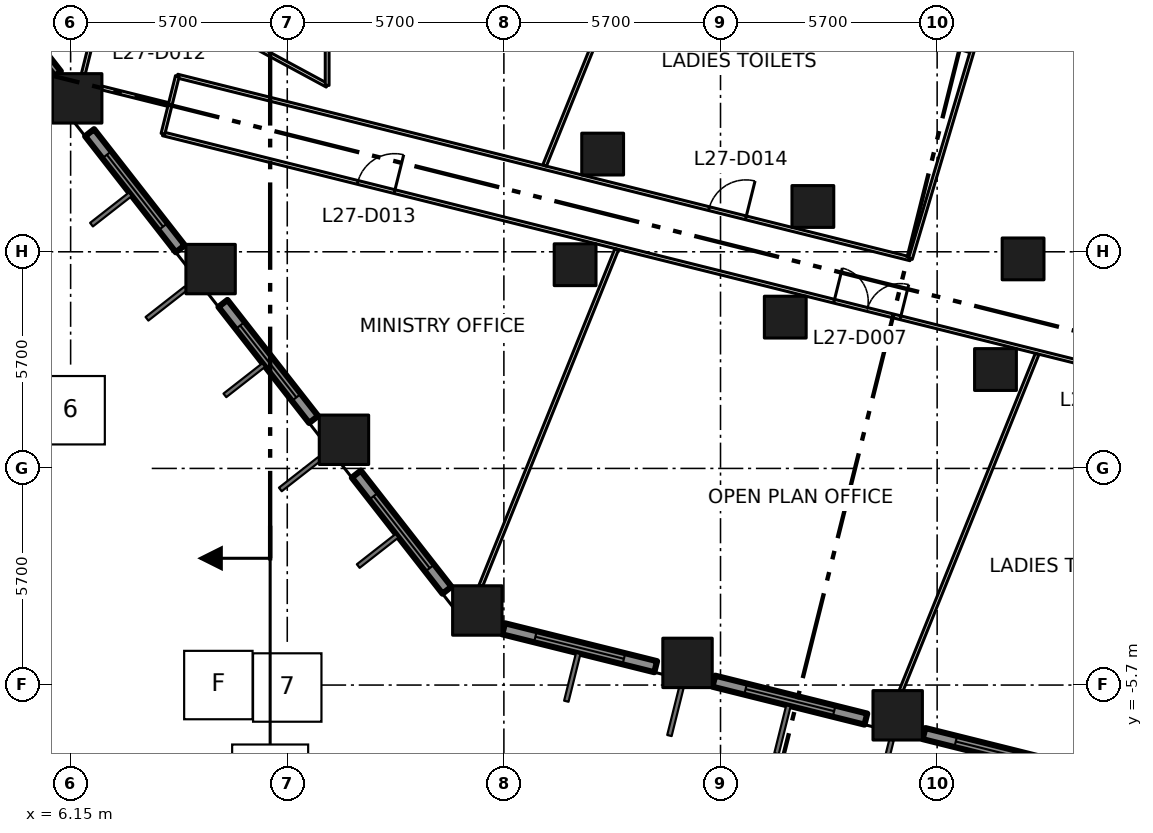
"""IFC4 building model, lengths in metres.
Left out: names, types, materials, properties, quantities, classifications, styles, units other than length and angle.
Written with IfcOpenShell. Run it as: python <this file> out.ifc"""

import sys

from ifc_helpers import new_model, si_unit, direction, frame, frame_2d, origin, origin_2d, place, context, subcontext, project, spatial, rectangle, extrude, element, fill, save


model = new_model("IFC4")
c1 = context("Model", 3, precision=1e-05, world=origin(), true_north=direction((0.0, 1.0)))
c2 = subcontext(c1, "Body", "Model", "MODEL_VIEW")
j1 = project(units=[si_unit("LENGTHUNIT", "METRE"), si_unit("PLANEANGLEUNIT", "RADIAN")], contexts=[c1])
p1 = place(None, origin())
s1 = spatial("IfcSite", under=j1, at=p1, CompositionType="ELEMENT")
p2 = place(p1, origin())
s2 = spatial("IfcBuilding", under=s1, at=p2, CompositionType="ELEMENT")
p3 = place(p2, frame((0.0, 0.0, 122.4)))
s3 = spatial("IfcBuildingStorey", under=s2, at=p3, CompositionType="ELEMENT", Elevation=122.4)
for number, where, z_axis, x_axis in (
    (1, (16.851, -3.738, 0.0), (0.0, 0.0, 1.0), (1.0, 0.0, 0.0)),
    (2, (13.342, 0.754, 0.0), (0.0, 0.0, 1.0), (1.0, 0.0, 0.0)),
    (3, (9.833, 5.245, 0.0), (0.0, 0.0, 1.0), (1.0, 0.0, 0.0)),
    (4, (6.323, 9.737, 0.0), (0.0, 0.0, 1.0), (1.0, 0.0, 0.0)),
    (5, (22.382, -5.117, 0.0), (0.0, 0.0, 1.0), (1.0, 0.0, 0.0)),
    (6, (27.912, -6.496, 0.0), (0.0, 0.0, 1.0), (1.0, 0.0, 0.0)),
):
    element("IfcColumn", number, at=place(p3, frame(where, z_axis=z_axis, x_axis=x_axis)), inside=s3, PredefinedType="COLUMN", context=c2, shape_type="SweptSolid", body=[
        extrude(rectangle(XDim=1.3, YDim=1.3, at=origin_2d()), origin(), (0.0, 0.0, 1.0), 4.2),
    ])
for number, where, z_axis, x_axis in (
    (7, (19.424, 5.36, 0.0), (0.0, 0.0, 1.0), (1.0, 0.0, 0.0)),
    (8, (24.954, 3.981, 0.0), (0.0, 0.0, 1.0), (1.0, 0.0, 0.0)),
    (9, (30.485, 2.602, 0.0), (0.0, 0.0, 1.0), (1.0, 0.0, 0.0)),
    (10, (20.149, 8.271, 0.0), (0.0, 0.0, 1.0), (1.0, 0.0, 0.0)),
    (11, (25.68, 6.892, 0.0), (0.0, 0.0, 1.0), (1.0, 0.0, 0.0)),
    (12, (31.211, 5.513, 0.0), (0.0, 0.0, 1.0), (1.0, 0.0, 0.0)),
):
    element("IfcColumn", number, at=place(p3, frame(where, z_axis=z_axis, x_axis=x_axis)), inside=s3, PredefinedType="COLUMN", context=c2, shape_type="SweptSolid", body=[
        extrude(rectangle(XDim=1.1, YDim=1.1, at=origin_2d()), origin(), (0.0, 0.0, 1.0), 4.2),
    ])
p4 = place(p3, frame((3.322, 13.579, 0.0), z_axis=(0.0, 0.0, 1.0), x_axis=(0.615500153734, -0.78813676526, 0.0)))
e13 = element("IfcWall", 13, at=p4, inside=s3, PredefinedType="SOLIDWALL", context=c2, shape_type="SweptSolid", body=[
    extrude(rectangle(XDim=4.05, YDim=0.2, at=frame_2d((2.025, 0.0))), origin(), (0.0, 0.0, 1.0), 3.1),
])
p5 = place(p4, frame((1.125, 0.0, 0.0)))
e14 = element("IfcOpeningElement", 14, at=p5, cuts=e13, PredefinedType="OPENING", context=c2, shape_type="SweptSolid", body=[
    extrude(rectangle(XDim=1.8, YDim=2.9, at=frame_2d((0.9, 1.45))), frame((0.0, 0.11, 0.0), z_axis=(0.0, -1.0, 0.0), x_axis=(1.0, 0.0, 0.0)), (0.0, 0.0, 1.0), 0.22),
])
p6 = place(p3, frame((6.649, 8.834, 0.0), z_axis=(0.0, 0.0, 1.0), x_axis=(0.615535257281, -0.788109349674, 0.0)))
e15 = element("IfcWall", 15, at=p6, inside=s3, PredefinedType="SOLIDWALL", context=c2, shape_type="SweptSolid", body=[
    extrude(rectangle(XDim=3.876, YDim=0.3, at=frame_2d((1.938, 0.0))), origin(), (0.0, 0.0, 1.0), 3.1),
])
p7 = place(p6, frame((0.738, 0.0, 0.8)))
e16 = element("IfcOpeningElement", 16, at=p7, cuts=e15, PredefinedType="OPENING", context=c2, shape_type="SweptSolid", body=[
    extrude(rectangle(XDim=2.4, YDim=2.1, at=frame_2d((1.2, 1.05))), frame((0.0, 0.16, 0.0), z_axis=(0.0, -1.0, 0.0), x_axis=(1.0, 0.0, 0.0)), (0.0, 0.0, 1.0), 0.32),
])
p8 = place(p3, frame((10.158, 4.341, 0.0), z_axis=(0.0, 0.0, 1.0), x_axis=(0.615779754703, -0.787918329332, 0.0)))
e17 = element("IfcWall", 17, at=p8, inside=s3, PredefinedType="SOLIDWALL", context=c2, shape_type="SweptSolid", body=[
    extrude(rectangle(XDim=3.875, YDim=0.3, at=frame_2d((1.938, 0.0))), origin(), (0.0, 0.0, 1.0), 3.1),
])
p9 = place(p8, frame((0.737, 0.0, 0.8)))
e18 = element("IfcOpeningElement", 18, at=p9, cuts=e17, PredefinedType="OPENING", context=c2, shape_type="SweptSolid", body=[
    extrude(rectangle(XDim=2.4, YDim=2.1, at=frame_2d((1.2, 1.05))), frame((0.0, 0.16, 0.0), z_axis=(0.0, -1.0, 0.0), x_axis=(1.0, 0.0, 0.0)), (0.0, 0.0, 1.0), 0.32),
])
p10 = place(p3, frame((13.667, -0.15, 0.0), z_axis=(0.0, 0.0, 1.0), x_axis=(0.615626928003, -0.788037743714, 0.0)))
e19 = element("IfcWall", 19, at=p10, inside=s3, PredefinedType="SOLIDWALL", context=c2, shape_type="SweptSolid", body=[
    extrude(rectangle(XDim=3.876, YDim=0.3, at=frame_2d((1.938, 0.0))), origin(), (0.0, 0.0, 1.0), 3.1),
])
p11 = place(p10, frame((0.738, 0.0, 0.8)))
e20 = element("IfcOpeningElement", 20, at=p11, cuts=e19, PredefinedType="OPENING", context=c2, shape_type="SweptSolid", body=[
    extrude(rectangle(XDim=2.4, YDim=2.1, at=frame_2d((1.2, 1.05))), frame((0.0, 0.16, 0.0), z_axis=(0.0, -1.0, 0.0), x_axis=(1.0, 0.0, 0.0)), (0.0, 0.0, 1.0), 0.32),
])
p12 = place(p3, frame((17.543, -4.22, 0.0), z_axis=(0.0, 0.0, 1.0), x_axis=(0.970337184445, -0.241755555227, 0.0)))
e21 = element("IfcWall", 21, at=p12, inside=s3, PredefinedType="SOLIDWALL", context=c2, shape_type="SweptSolid", body=[
    extrude(rectangle(XDim=4.124, YDim=0.3, at=frame_2d((2.062, 0.0))), origin(), (0.0, 0.0, 1.0), 3.1),
])
p13 = place(p12, frame((0.862, 0.0, 0.8)))
e22 = element("IfcOpeningElement", 22, at=p13, cuts=e21, PredefinedType="OPENING", context=c2, shape_type="SweptSolid", body=[
    extrude(rectangle(XDim=2.4, YDim=2.1, at=frame_2d((1.2, 1.05))), frame((0.0, 0.16, 0.0), z_axis=(0.0, -1.0, 0.0), x_axis=(1.0, 0.0, 0.0)), (0.0, 0.0, 1.0), 0.32),
])
p14 = place(p3, frame((23.074, -5.598, 0.0), z_axis=(0.0, 0.0, 1.0), x_axis=(0.970267747908, -0.242034083076, 0.0)))
e23 = element("IfcWall", 23, at=p14, inside=s3, PredefinedType="SOLIDWALL", context=c2, shape_type="SweptSolid", body=[
    extrude(rectangle(XDim=4.124, YDim=0.3, at=frame_2d((2.062, 0.0))), origin(), (0.0, 0.0, 1.0), 3.1),
])
p15 = place(p14, frame((0.862, 0.0, 0.8)))
e24 = element("IfcOpeningElement", 24, at=p15, cuts=e23, PredefinedType="OPENING", context=c2, shape_type="SweptSolid", body=[
    extrude(rectangle(XDim=2.4, YDim=2.1, at=frame_2d((1.2, 1.05))), frame((0.0, 0.16, 0.0), z_axis=(0.0, -1.0, 0.0), x_axis=(1.0, 0.0, 0.0)), (0.0, 0.0, 1.0), 0.32),
])
p16 = place(p3, frame((28.604, -6.977, 0.0), z_axis=(0.0, 0.0, 1.0), x_axis=(0.970281616392, -0.241978480223, 0.0)))
e25 = element("IfcWall", 25, at=p16, inside=s3, PredefinedType="SOLIDWALL", context=c2, shape_type="SweptSolid", body=[
    extrude(rectangle(XDim=4.125, YDim=0.3, at=frame_2d((2.062, 0.0))), origin(), (0.0, 0.0, 1.0), 3.1),
])
p17 = place(p16, frame((0.862, 0.0, 0.8)))
e26 = element("IfcOpeningElement", 26, at=p17, cuts=e25, PredefinedType="OPENING", context=c2, shape_type="SweptSolid", body=[
    extrude(rectangle(XDim=2.4, YDim=2.1, at=frame_2d((1.2, 1.05))), frame((0.0, 0.16, 0.0), z_axis=(0.0, -1.0, 0.0), x_axis=(1.0, 0.0, 0.0)), (0.0, 0.0, 1.0), 0.32),
])
p18 = place(p3, frame((8.579, 8.803, 0.0), z_axis=(0.0, 0.0, 1.0), x_axis=(0.970297306393, -0.241915558008, 0.0)))
e27 = element("IfcWall", 27, at=p18, inside=s3, PredefinedType="PARTITIONING", context=c2, shape_type="SweptSolid", body=[
    extrude(rectangle(XDim=62.076, YDim=0.1, at=frame_2d((31.038, 0.0))), origin(), (0.0, 0.0, 1.0), 3.9),
])
p19 = place(p18, frame((35.799, 0.0, 0.0)))
e28 = element("IfcOpeningElement", 28, at=p19, cuts=e27, PredefinedType="OPENING", context=c2, shape_type="SweptSolid", body=[
    extrude(rectangle(XDim=1.8, YDim=2.1, at=frame_2d((0.9, 1.05))), frame((0.0, 0.06, 0.0), z_axis=(0.0, -1.0, 0.0), x_axis=(1.0, 0.0, 0.0)), (0.0, 0.0, 1.0), 0.12),
])
p20 = place(p18, frame((47.799, 0.0, 0.0)))
e29 = element("IfcOpeningElement", 29, at=p20, cuts=e27, PredefinedType="OPENING", context=c2, shape_type="SweptSolid", body=[
    extrude(rectangle(XDim=1.8, YDim=2.1, at=frame_2d((0.9, 1.05))), frame((0.0, 0.06, 0.0), z_axis=(0.0, -1.0, 0.0), x_axis=(1.0, 0.0, 0.0)), (0.0, 0.0, 1.0), 0.12),
])
p21 = place(p18, frame((53.599, 0.0, 0.0)))
e30 = element("IfcOpeningElement", 30, at=p21, cuts=e27, PredefinedType="OPENING", context=c2, shape_type="SweptSolid", body=[
    extrude(rectangle(XDim=1.0, YDim=2.1, at=frame_2d((0.5, 1.05))), frame((0.0, 0.06, 0.0), z_axis=(0.0, -1.0, 0.0), x_axis=(1.0, 0.0, 0.0)), (0.0, 0.0, 1.0), 0.12),
])
p22 = place(p18, frame((18.2, 0.0, 0.0)))
e31 = element("IfcOpeningElement", 31, at=p22, cuts=e27, PredefinedType="OPENING", context=c2, shape_type="SweptSolid", body=[
    extrude(rectangle(XDim=1.8, YDim=2.1, at=frame_2d((0.9, 1.05))), frame((0.0, 0.06, 0.0), z_axis=(0.0, -1.0, 0.0), x_axis=(1.0, 0.0, 0.0)), (0.0, 0.0, 1.0), 0.12),
])
p23 = place(p18, frame((26.099, 0.0, 0.0)))
e32 = element("IfcOpeningElement", 32, at=p23, cuts=e27, PredefinedType="OPENING", context=c2, shape_type="SweptSolid", body=[
    extrude(rectangle(XDim=1.0, YDim=2.1, at=frame_2d((0.5, 1.05))), frame((0.0, 0.06, 0.0), z_axis=(0.0, -1.0, 0.0), x_axis=(1.0, 0.0, 0.0)), (0.0, 0.0, 1.0), 0.12),
])
p24 = place(p18, frame((5.28, 0.0, 0.0)))
e33 = element("IfcOpeningElement", 33, at=p24, cuts=e27, PredefinedType="OPENING", context=c2, shape_type="SweptSolid", body=[
    extrude(rectangle(XDim=1.0, YDim=2.1, at=frame_2d((0.5, 1.05))), frame((0.0, 0.06, 0.0), z_axis=(0.0, -1.0, 0.0), x_axis=(1.0, 0.0, 0.0)), (0.0, 0.0, 1.0), 0.12),
])
p25 = place(p3, frame((8.958, 10.323, 0.0), z_axis=(0.0, 0.0, 1.0), x_axis=(0.970298340477, -0.241911410372, 0.0)))
e34 = element("IfcWall", 34, at=p25, inside=s3, PredefinedType="PARTITIONING", context=c2, shape_type="SweptSolid", body=[
    extrude(rectangle(XDim=19.88, YDim=0.1, at=frame_2d((9.94, 0.0))), origin(), (0.0, 0.0, 1.0), 3.9),
])
p26 = place(p25, frame((14.417, 0.0, 0.0)))
e35 = element("IfcOpeningElement", 35, at=p26, cuts=e34, PredefinedType="OPENING", context=c2, shape_type="SweptSolid", body=[
    extrude(rectangle(XDim=1.0, YDim=2.1, at=frame_2d((0.5, 1.05))), frame((0.0, 0.06, 0.0), z_axis=(0.0, -1.0, 0.0), x_axis=(1.0, 0.0, 0.0)), (0.0, 0.0, 1.0), 0.12),
])
p27 = place(p3, frame((8.958, 10.323, 0.0), z_axis=(0.0, 0.0, 1.0), x_axis=(-0.241875508386, -0.97030729073, 0.0)))
e36 = element("IfcWall", 36, at=p27, inside=s3, PredefinedType="PARTITIONING", context=c2, shape_type="SweptSolid", body=[
    extrude(rectangle(XDim=1.567, YDim=0.1, at=frame_2d((0.783, 0.0))), origin(), (0.0, 0.0, 1.0), 3.9),
])
p28 = place(p3, frame((9.9, 11.7, 0.0), z_axis=(0.0, 0.0, 1.0), x_axis=(0.87965147249, -0.475618846291, 0.0)))
e37 = element("IfcWall", 37, at=p28, inside=s3, PredefinedType="PARTITIONING", context=c2, shape_type="SweptSolid", body=[
    extrude(rectangle(XDim=3.41, YDim=0.1, at=frame_2d((1.705, 0.0))), origin(), (0.0, 0.0, 1.0), 3.9),
])
p29 = place(p3, frame((12.9, 10.078, 0.0), z_axis=(0.0, 0.0, 1.0), x_axis=(0.0, 1.0, 0.0)))
e38 = element("IfcWall", 38, at=p29, inside=s3, PredefinedType="PARTITIONING", context=c2, shape_type="SweptSolid", body=[
    extrude(rectangle(XDim=4.022, YDim=0.1, at=frame_2d((2.011, 0.0))), origin(), (0.0, 0.0, 1.0), 3.9),
])
p30 = place(p3, frame((28.247, 5.514, 0.0), z_axis=(0.0, 0.0, 1.0), x_axis=(0.285004107837, 0.958526295162, 0.0)))
e39 = element("IfcWall", 39, at=p30, inside=s3, PredefinedType="PARTITIONING", context=c2, shape_type="SweptSolid", body=[
    extrude(rectangle(XDim=8.958, YDim=0.1, at=frame_2d((4.479, 0.0))), origin(), (0.0, 0.0, 1.0), 3.9),
])
p31 = place(p30, frame((6.38, 0.0, 0.0)))
e40 = element("IfcOpeningElement", 40, at=p31, cuts=e39, PredefinedType="OPENING", context=c2, shape_type="SweptSolid", body=[
    extrude(rectangle(XDim=1.0, YDim=2.1, at=frame_2d((0.5, 1.05))), frame((0.0, 0.06, 0.0), z_axis=(0.0, -1.0, 0.0), x_axis=(1.0, 0.0, 0.0)), (0.0, 0.0, 1.0), 0.12),
])
p32 = place(p3, frame((6.797, 11.638, 0.0), z_axis=(0.0, 0.0, 1.0), x_axis=(-0.242000927221, -0.970276018061, 0.0)))
e41 = element("IfcWall", 41, at=p32, inside=s3, PredefinedType="PARTITIONING", context=c2, shape_type="SweptSolid", body=[
    extrude(rectangle(XDim=1.289, YDim=0.1, at=frame_2d((0.645, 0.0))), origin(), (0.0, 0.0, 1.0), 3.9),
])
p33 = place(p3, frame((8.719, 9.575, 0.0), z_axis=(0.0, 0.0, 1.0), x_axis=(-0.970333736057, 0.241769395645, 0.0)))
e42 = element("IfcWall", 42, at=p33, inside=s3, PredefinedType="PARTITIONING", context=c2, shape_type="SweptSolid", body=[
    extrude(rectangle(XDim=1.8, YDim=0.1, at=frame_2d((0.9, 0.0))), origin(), (0.0, 0.0, 1.0), 3.9),
])
p34 = place(p3, frame((16.942, -3.088, 0.0), z_axis=(0.0, 0.0, 1.0), x_axis=(0.374526444387, 0.927216232847, 0.0)))
e43 = element("IfcWall", 43, at=p34, inside=s3, PredefinedType="PARTITIONING", context=c2, shape_type="SweptSolid", body=[
    extrude(rectangle(XDim=9.551, YDim=0.1, at=frame_2d((4.775, 0.0))), origin(), (0.0, 0.0, 1.0), 3.9),
])
p35 = place(p3, frame((18.622, 7.972, 0.0), z_axis=(0.0, 0.0, 1.0), x_axis=(0.374464881939, 0.927241097123, 0.0)))
e44 = element("IfcWall", 44, at=p35, inside=s3, PredefinedType="PARTITIONING", context=c2, shape_type="SweptSolid", body=[
    extrude(rectangle(XDim=6.609, YDim=0.1, at=frame_2d((3.305, 0.0))), origin(), (0.0, 0.0, 1.0), 3.9),
])
p36 = place(p3, frame((28.002, -5.846, 0.0), z_axis=(0.0, 0.0, 1.0), x_axis=(0.374614343131, 0.927180723441, 0.0)))
e45 = element("IfcWall", 45, at=p36, inside=s3, PredefinedType="PARTITIONING", context=c2, shape_type="SweptSolid", body=[
    extrude(rectangle(XDim=9.552, YDim=0.1, at=frame_2d((4.776, 0.0))), origin(), (0.0, 0.0, 1.0), 3.9),
])
p37 = place(p3, frame((29.824, 10.991, 0.0), z_axis=(0.0, 0.0, 1.0), x_axis=(-0.958521516937, 0.285020177478, 0.0)))
e46 = element("IfcWall", 46, at=p37, inside=s3, PredefinedType="PARTITIONING", context=c2, shape_type="SweptSolid", body=[
    extrude(rectangle(XDim=2.551, YDim=0.1, at=frame_2d((1.275, 0.0))), origin(), (0.0, 0.0, 1.0), 3.9),
])
p38 = place(p7, origin())
e47 = element("IfcWindow", 47, at=p38, inside=s3, PartitioningType="DOUBLE_PANEL_VERTICAL", PredefinedType="WINDOW", context=c2, shape_type="SweptSolid", body=[
    extrude(rectangle(XDim=2.4, YDim=2.1, at=frame_2d((1.2, 1.05))), frame((0.0, 0.03, 0.0), z_axis=(0.0, -1.0, 0.0), x_axis=(1.0, 0.0, 0.0)), (0.0, 0.0, 1.0), 0.06),
])
fill(e16, e47)
p39 = place(p9, origin())
e48 = element("IfcWindow", 48, at=p39, inside=s3, PartitioningType="DOUBLE_PANEL_VERTICAL", PredefinedType="WINDOW", context=c2, shape_type="SweptSolid", body=[
    extrude(rectangle(XDim=2.4, YDim=2.1, at=frame_2d((1.2, 1.05))), frame((0.0, 0.03, 0.0), z_axis=(0.0, -1.0, 0.0), x_axis=(1.0, 0.0, 0.0)), (0.0, 0.0, 1.0), 0.06),
])
fill(e18, e48)
p40 = place(p11, origin())
e49 = element("IfcWindow", 49, at=p40, inside=s3, PartitioningType="DOUBLE_PANEL_VERTICAL", PredefinedType="WINDOW", context=c2, shape_type="SweptSolid", body=[
    extrude(rectangle(XDim=2.4, YDim=2.1, at=frame_2d((1.2, 1.05))), frame((0.0, 0.03, 0.0), z_axis=(0.0, -1.0, 0.0), x_axis=(1.0, 0.0, 0.0)), (0.0, 0.0, 1.0), 0.06),
])
fill(e20, e49)
p41 = place(p13, origin())
e50 = element("IfcWindow", 50, at=p41, inside=s3, PartitioningType="DOUBLE_PANEL_VERTICAL", PredefinedType="WINDOW", context=c2, shape_type="SweptSolid", body=[
    extrude(rectangle(XDim=2.4, YDim=2.1, at=frame_2d((1.2, 1.05))), frame((0.0, 0.03, 0.0), z_axis=(0.0, -1.0, 0.0), x_axis=(1.0, 0.0, 0.0)), (0.0, 0.0, 1.0), 0.06),
])
fill(e22, e50)
p42 = place(p15, origin())
e51 = element("IfcWindow", 51, at=p42, inside=s3, PartitioningType="DOUBLE_PANEL_VERTICAL", PredefinedType="WINDOW", context=c2, shape_type="SweptSolid", body=[
    extrude(rectangle(XDim=2.4, YDim=2.1, at=frame_2d((1.2, 1.05))), frame((0.0, 0.03, 0.0), z_axis=(0.0, -1.0, 0.0), x_axis=(1.0, 0.0, 0.0)), (0.0, 0.0, 1.0), 0.06),
])
fill(e24, e51)
p43 = place(p17, origin())
e52 = element("IfcWindow", 52, at=p43, inside=s3, PartitioningType="DOUBLE_PANEL_VERTICAL", PredefinedType="WINDOW", context=c2, shape_type="SweptSolid", body=[
    extrude(rectangle(XDim=2.4, YDim=2.1, at=frame_2d((1.2, 1.05))), frame((0.0, 0.03, 0.0), z_axis=(0.0, -1.0, 0.0), x_axis=(1.0, 0.0, 0.0)), (0.0, 0.0, 1.0), 0.06),
])
fill(e26, e52)
p44 = place(p22, origin())
e53 = element("IfcDoor", 53, at=p44, inside=s3, OperationType="DOUBLE_DOOR_SINGLE_SWING", PredefinedType="DOOR", context=c2, shape_type="SweptSolid", body=[
    extrude(rectangle(XDim=1.8, YDim=2.1, at=frame_2d((0.9, 1.05))), frame((0.0, 0.025, 0.0), z_axis=(0.0, -1.0, 0.0), x_axis=(1.0, 0.0, 0.0)), (0.0, 0.0, 1.0), 0.05),
])
fill(e31, e53)
p45 = place(p24, origin())
e54 = element("IfcDoor", 54, at=p45, inside=s3, OperationType="SINGLE_SWING_RIGHT", PredefinedType="DOOR", context=c2, shape_type="SweptSolid", body=[
    extrude(rectangle(XDim=1.0, YDim=2.1, at=frame_2d((0.5, 1.05))), frame((0.0, 0.025, 0.0), z_axis=(0.0, -1.0, 0.0), x_axis=(1.0, 0.0, 0.0)), (0.0, 0.0, 1.0), 0.05),
])
fill(e33, e54)
p46 = place(p26, origin())
e55 = element("IfcDoor", 55, at=p46, inside=s3, OperationType="SINGLE_SWING_RIGHT", PredefinedType="DOOR", context=c2, shape_type="SweptSolid", body=[
    extrude(rectangle(XDim=1.0, YDim=2.1, at=frame_2d((0.5, 1.05))), frame((0.0, 0.025, 0.0), z_axis=(0.0, -1.0, 0.0), x_axis=(1.0, 0.0, 0.0)), (0.0, 0.0, 1.0), 0.05),
])
fill(e35, e55)
save(model, sys.argv[1])
